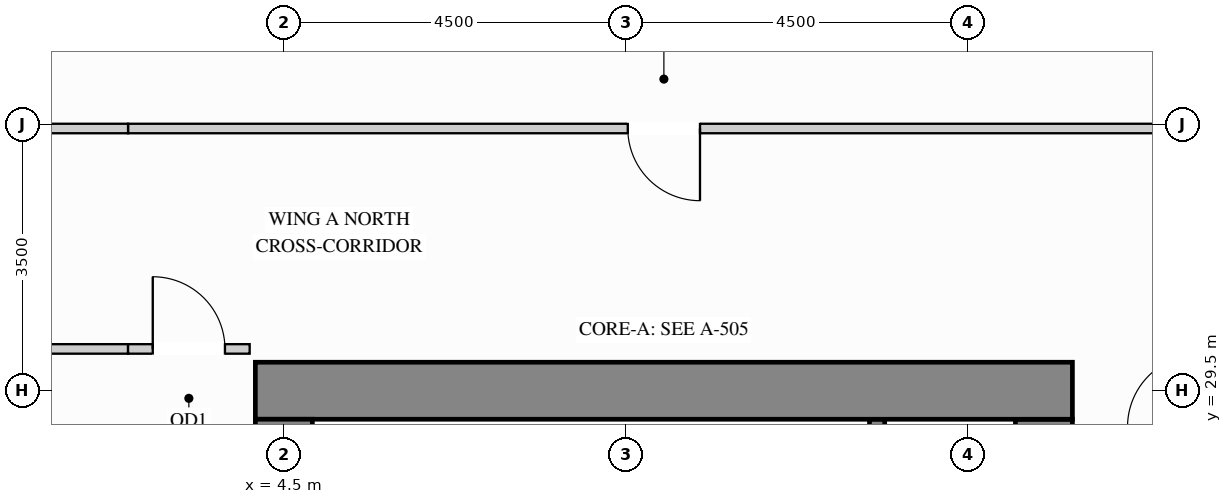
"""IFC4 building model, lengths in metres.
Left out: names, types, materials, properties, quantities, classifications, styles, units other than length and angle.
Written with IfcOpenShell. Run it as: python <this file> out.ifc"""

import sys

from ifc_helpers import new_model, si_unit, direction, frame, frame_2d, origin, place, context, subcontext, project, spatial, rectangle, extrude, source, transform, mapped, element, fill, save


model = new_model("IFC4")
c1 = context("Model", 3, precision=1e-05, world=origin(), true_north=direction((0.0, 1.0)))
c2 = subcontext(c1, "Body", "Model", "MODEL_VIEW")
j1 = project(units=[si_unit("LENGTHUNIT", "METRE"), si_unit("PLANEANGLEUNIT", "RADIAN")], contexts=[c1])
p1 = place(None, origin())
s1 = spatial("IfcSite", under=j1, at=p1, CompositionType="ELEMENT")
p2 = place(p1, origin())
s2 = spatial("IfcBuilding", under=s1, at=p2, CompositionType="ELEMENT")
p3 = place(p2, frame((0.0, 0.0, 124.2)))
s3 = spatial("IfcBuildingStorey", under=s2, at=p3, CompositionType="ELEMENT", Elevation=124.2)
m1 = source(origin(), c2, "Body", "SweptSolid", [
    extrude(rectangle(XDim=8.245, YDim=0.75, at=frame_2d((4.123, 0.0))), origin(), (0.0, 0.0, 1.0), 3.38),
])
p4 = place(p3, frame((14.5, 20.88, 0.0), z_axis=(0.0, 0.0, 1.0), x_axis=(0.0, 1.0, 0.0)))
e1 = element("IfcWall", 1, at=p4, inside=s3, PredefinedType="SHEAR", context=c2, shape_type="MappedRepresentation", body=[
    mapped(m1, transform((0.0, 0.0, 0.0), x_axis=(1.0, 0.0, 0.0), y_axis=(0.0, 1.0, 0.0), z_axis=(0.0, 0.0, 1.0))),
])
m2 = source(origin(), c2, "Body", "SweptSolid", [
    extrude(rectangle(XDim=10.75, YDim=0.75, at=frame_2d((5.375, 0.0))), origin(), (0.0, 0.0, 1.0), 3.38),
])
p5 = place(p3, frame((4.125, 29.5, 0.0), z_axis=(0.0, 0.0, 1.0), x_axis=(1.0, 0.0, 0.0)))
e2 = element("IfcWall", 2, at=p5, inside=s3, PredefinedType="SHEAR", context=c2, shape_type="MappedRepresentation", body=[
    mapped(m2, transform((0.0, 0.0, 0.0), x_axis=(1.0, 0.0, 0.0), y_axis=(0.0, 1.0, 0.0), z_axis=(0.0, 0.0, 1.0))),
])
m3 = source(origin(), c2, "Body", "SweptSolid", [
    extrude(rectangle(XDim=20.25, YDim=0.75, at=frame_2d((10.125, 0.0))), origin(), (0.0, 0.0, 1.0), 3.38),
])
p6 = place(p3, frame((4.5, 8.875, 0.0), z_axis=(0.0, 0.0, 1.0), x_axis=(0.0, 1.0, 0.0)))
e3 = element("IfcWall", 3, at=p6, inside=s3, PredefinedType="SHEAR", context=c2, shape_type="MappedRepresentation", body=[
    mapped(m3, transform((0.0, 0.0, 0.0), x_axis=(1.0, 0.0, 0.0), y_axis=(0.0, 1.0, 0.0), z_axis=(0.0, 0.0, 1.0))),
])
p7 = place(p3, frame((2.45, 32.95, 0.0), z_axis=(0.0, 0.0, 1.0), x_axis=(1.0, 0.0, 0.0)))
e4 = element("IfcWall", 4, at=p7, inside=s3, PredefinedType="PARTITIONING", context=c2, shape_type="SweptSolid", body=[
    extrude(rectangle(XDim=14.1, YDim=0.125, at=frame_2d((7.05, 0.0))), origin(), (0.0, 0.0, 1.0), 3.365),
])
p8 = place(p7, frame((6.575, 0.0, 0.0)))
e5 = element("IfcOpeningElement", 5, at=p8, cuts=e4, PredefinedType="OPENING", context=c2, shape_type="SweptSolid", body=[
    extrude(rectangle(XDim=0.95, YDim=2.15, at=frame_2d((0.475, 1.075))), frame((0.0, 0.073, 0.0), z_axis=(0.0, -1.0, 0.0), x_axis=(1.0, 0.0, 0.0)), (0.0, 0.0, 1.0), 0.145),
])
m4 = source(origin(), c2, "Body", "SweptSolid", [
    extrude(rectangle(XDim=2.098, YDim=0.125, at=frame_2d((1.049, 0.0))), origin(), (0.0, 0.0, 1.0), 3.365),
])
p9 = place(p3, frame((0.352, 32.95, 0.0), z_axis=(0.0, 0.0, 1.0), x_axis=(1.0, 0.0, 0.0)))
e6 = element("IfcWall", 6, at=p9, inside=s3, PredefinedType="PARTITIONING", context=c2, shape_type="MappedRepresentation", body=[
    mapped(m4, transform((0.0, 0.0, 0.0), x_axis=(1.0, 0.0, 0.0), y_axis=(0.0, 1.0, 0.0), z_axis=(0.0, 0.0, 1.0))),
])
m5 = source(origin(), c2, "Body", "SweptSolid", [
    extrude(rectangle(XDim=1.26, YDim=0.125, at=frame_2d((0.63, 0.0))), origin(), (0.0, 0.0, 1.0), 3.365),
])
p10 = place(p3, frame((1.19, 30.05, 0.0), z_axis=(0.0, 0.0, 1.0), x_axis=(1.0, 0.0, 0.0)))
e7 = element("IfcWall", 7, at=p10, inside=s3, PredefinedType="PARTITIONING", context=c2, shape_type="MappedRepresentation", body=[
    mapped(m5, transform((0.0, 0.0, 0.0), x_axis=(1.0, 0.0, 0.0), y_axis=(0.0, 1.0, 0.0), z_axis=(0.0, 0.0, 1.0))),
])
p11 = place(p3, frame((2.45, 30.05, 0.0), z_axis=(0.0, 0.0, 1.0), x_axis=(1.0, 0.0, 0.0)))
e8 = element("IfcWall", 8, at=p11, inside=s3, PredefinedType="PARTITIONING", context=c2, shape_type="SweptSolid", body=[
    extrude(rectangle(XDim=1.6, YDim=0.125, at=frame_2d((0.8, 0.0))), origin(), (0.0, 0.0, 1.0), 3.365),
])
p12 = place(p11, frame((0.325, 0.0, 0.0)))
e9 = element("IfcOpeningElement", 9, at=p12, cuts=e8, PredefinedType="OPENING", context=c2, shape_type="SweptSolid", body=[
    extrude(rectangle(XDim=0.95, YDim=2.15, at=frame_2d((0.475, 1.075))), frame((0.0, 0.073, 0.0), z_axis=(0.0, -1.0, 0.0), x_axis=(1.0, 0.0, 0.0)), (0.0, 0.0, 1.0), 0.145),
])
m6 = source(origin(), c2, "Body", "SweptSolid", [
    extrude(rectangle(XDim=3.678, YDim=0.2, at=frame_2d((1.839, 0.0))), origin(), (0.0, 0.0, 1.0), 3.38),
])
p13 = place(p3, frame((12.305, 25.445, 0.0), z_axis=(0.0, 0.0, 1.0), x_axis=(0.0, 1.0, 0.0)))
e10 = element("IfcWall", 10, at=p13, inside=s3, PredefinedType="SHEAR", context=c2, shape_type="MappedRepresentation", body=[
    mapped(m6, transform((0.0, 0.0, 0.0), x_axis=(1.0, 0.0, 0.0), y_axis=(0.0, 1.0, 0.0), z_axis=(0.0, 0.0, 1.0))),
])
m7 = source(origin(), c2, "Body", "SweptSolid", [
    extrude(rectangle(XDim=0.95, YDim=2.15, at=frame_2d((0.475, 1.075))), frame((0.0, 0.025, 0.0), z_axis=(0.0, -1.0, 0.0), x_axis=(1.0, 0.0, 0.0)), (0.0, 0.0, 1.0), 0.05),
])
p14 = place(p8, origin())
e11 = element("IfcDoor", 11, at=p14, inside=s3, OperationType="SINGLE_SWING_RIGHT", PredefinedType="DOOR", context=c2, shape_type="MappedRepresentation", body=[
    mapped(m7, transform((0.0, 0.0, 0.0), x_axis=(1.0, 0.0, 0.0), y_axis=(0.0, 1.0, 0.0), z_axis=(0.0, 0.0, 1.0))),
])
fill(e5, e11)
p15 = place(p12, origin())
e12 = element("IfcDoor", 12, at=p15, inside=s3, OperationType="SINGLE_SWING_LEFT", PredefinedType="DOOR", context=c2, shape_type="MappedRepresentation", body=[
    mapped(m7, transform((0.0, 0.0, 0.0), x_axis=(1.0, 0.0, 0.0), y_axis=(0.0, 1.0, 0.0), z_axis=(0.0, 0.0, 1.0))),
])
fill(e9, e12)
save(model, sys.argv[1])
